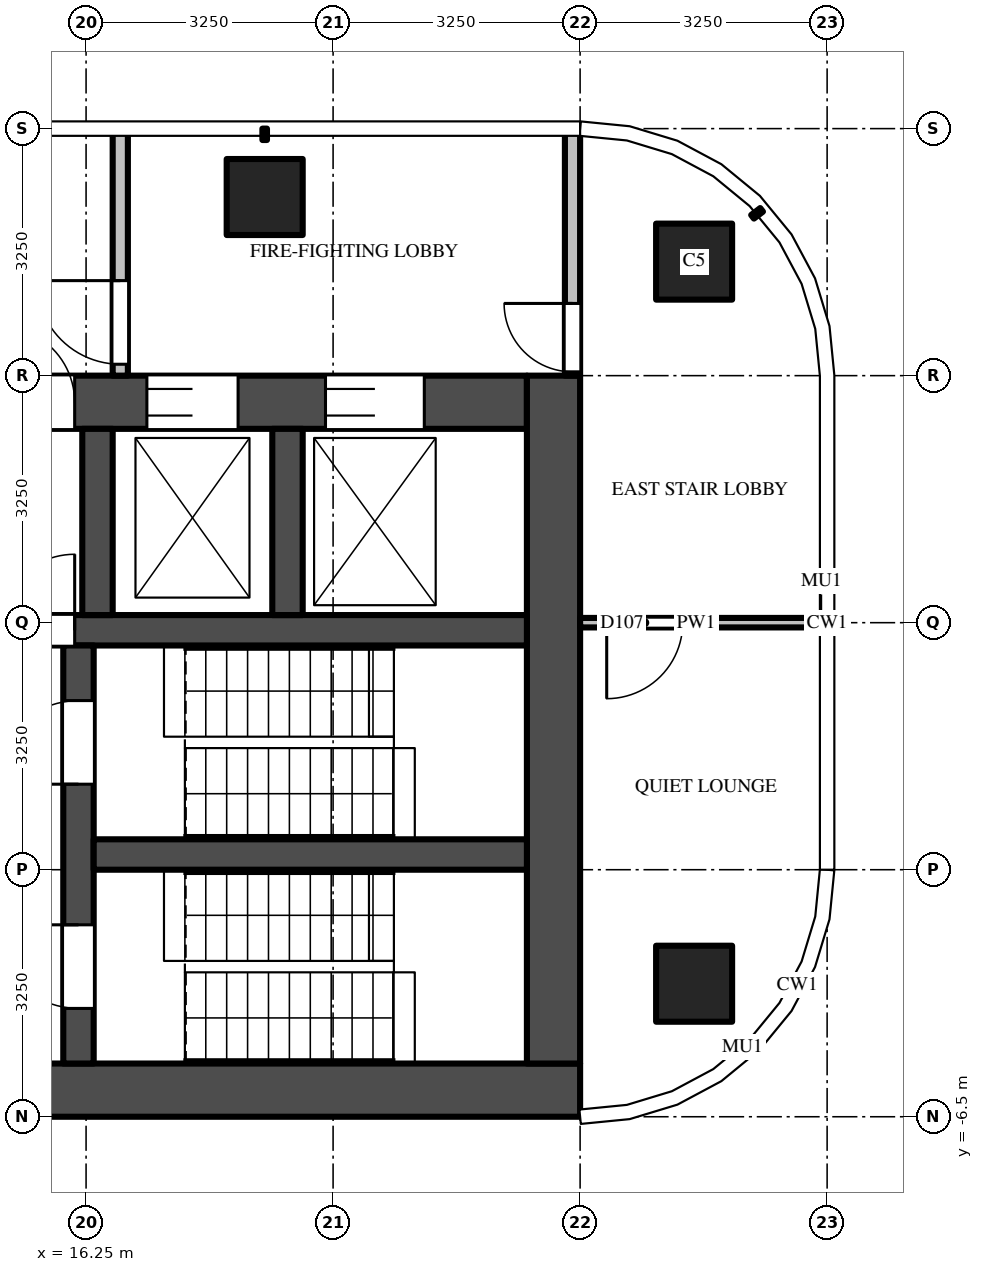
"""IFC4 building model, lengths in metres.
Left out: names, types, materials, properties, quantities, classifications, styles, units other than length and angle.
Written with IfcOpenShell. Run it as: python <this file> out.ifc"""

import sys

from ifc_helpers import new_model, si_unit, direction, frame, frame_2d, origin, origin_2d, place, context, subcontext, project, spatial, rectangle, extrude, source, transform, mapped, element, fill, save


model = new_model("IFC4")
c1 = context("Model", 3, precision=1e-05, world=origin(), true_north=direction((0.0, 1.0)))
c2 = subcontext(c1, "Body", "Model", "MODEL_VIEW")
j1 = project(units=[si_unit("LENGTHUNIT", "METRE"), si_unit("PLANEANGLEUNIT", "RADIAN")], contexts=[c1])
p1 = place(None, origin())
s1 = spatial("IfcSite", under=j1, at=p1, CompositionType="ELEMENT")
p2 = place(p1, origin())
s2 = spatial("IfcBuilding", under=s1, at=p2, CompositionType="ELEMENT")
p3 = place(p2, frame((0.0, 0.0, 283.3)))
s3 = spatial("IfcBuildingStorey", under=s2, at=p3, CompositionType="ELEMENT", Elevation=283.3)
m1 = source(origin(), c2, "Body", "SweptSolid", [
    extrude(rectangle(XDim=1.0, YDim=1.0, at=origin_2d()), origin(), (0.0, 0.0, 1.0), 3.9),
])
for number, where, z_axis, x_axis in (
    (1, (18.6, 5.6, 0.0), (0.0, 0.0, 1.0), (1.0, 0.0, 0.0)),
    (2, (24.25, 4.75, 0.0), (0.0, 0.0, 1.0), (1.0, 0.0, 0.0)),
    (3, (24.25, -4.75, 0.0), (0.0, 0.0, 1.0), (1.0, 0.0, 0.0)),
):
    element("IfcColumn", number, at=place(p3, frame(where, z_axis=z_axis, x_axis=x_axis)), inside=s3, PredefinedType="COLUMN", context=c2, shape_type="MappedRepresentation", body=[
        mapped(m1, transform((0.0, 0.0, 0.0))),
    ])
m2 = source(origin(), c2, "Body", "SweptSolid", [
    extrude(rectangle(XDim=16.65, YDim=0.7, at=frame_2d((8.325, 0.0))), origin(), (0.0, 0.0, 1.0), 3.7),
])
p4 = place(p3, frame((6.1, -6.15, 0.0), z_axis=(0.0, 0.0, 1.0), x_axis=(1.0, 0.0, 0.0)))
e4 = element("IfcWall", 4, at=p4, inside=s3, PredefinedType="SHEAR", context=c2, shape_type="MappedRepresentation", body=[
    mapped(m2, transform((0.0, 0.0, 0.0))),
])
m3 = source(origin(), c2, "Body", "SweptSolid", [
    extrude(rectangle(XDim=14.85, YDim=0.7, at=frame_2d((7.425, 0.0))), origin(), (0.0, 0.0, 1.0), 3.7),
])
p5 = place(p3, frame((7.2, 2.9, 0.0), z_axis=(0.0, 0.0, 1.0), x_axis=(1.0, 0.0, 0.0)))
e5 = element("IfcWall", 5, at=p5, inside=s3, PredefinedType="SHEAR", context=c2, shape_type="MappedRepresentation", body=[
    mapped(m3, transform((0.0, 0.0, 0.0))),
])
m4 = source(origin(), c2, "Body", "SweptSolid", [
    extrude(rectangle(XDim=1.2, YDim=2.1, at=frame_2d((0.6, 1.05))), frame((0.0, 0.36, 0.0), z_axis=(0.0, -1.0, 0.0), x_axis=(1.0, 0.0, 0.0)), (0.0, 0.0, 1.0), 0.72),
])
p6 = place(p5, frame((5.7, 0.0, 0.0)))
e6 = element("IfcOpeningElement", 6, at=p6, cuts=e5, PredefinedType="OPENING", context=c2, shape_type="MappedRepresentation", body=[
    mapped(m4, transform((0.0, 0.0, 0.0))),
])
m5 = source(origin(), c2, "Body", "SweptSolid", [
    extrude(rectangle(XDim=1.3, YDim=2.1, at=frame_2d((0.65, 1.05))), frame((0.0, 0.36, 0.0), z_axis=(0.0, -1.0, 0.0), x_axis=(1.0, 0.0, 0.0)), (0.0, 0.0, 1.0), 0.72),
])
p7 = place(p5, frame((12.2, 0.0, 0.0)))
e7 = element("IfcOpeningElement", 7, at=p7, cuts=e5, PredefinedType="OPENING", context=c2, shape_type="MappedRepresentation", body=[
    mapped(m5, transform((0.0, 0.0, 0.0))),
])
p8 = place(p5, frame((9.85, 0.0, 0.0)))
e8 = element("IfcOpeningElement", 8, at=p8, cuts=e5, PredefinedType="OPENING", context=c2, shape_type="MappedRepresentation", body=[
    mapped(m4, transform((0.0, 0.0, 0.0))),
])
m6 = source(origin(), c2, "Body", "SweptSolid", [
    extrude(rectangle(XDim=1.0, YDim=2.1, at=frame_2d((0.5, 1.05))), frame((0.0, 0.36, 0.0), z_axis=(0.0, -1.0, 0.0), x_axis=(1.0, 0.0, 0.0)), (0.0, 0.0, 1.0), 0.72),
])
p9 = place(p5, frame((7.9, 0.0, 0.0)))
e9 = element("IfcOpeningElement", 9, at=p9, cuts=e5, PredefinedType="OPENING", context=c2, shape_type="MappedRepresentation", body=[
    mapped(m6, transform((0.0, 0.0, 0.0))),
])
m7 = source(origin(), c2, "Body", "SweptSolid", [
    extrude(rectangle(XDim=0.8, YDim=2.1, at=frame_2d((0.4, 1.05))), frame((0.0, 0.36, 0.0), z_axis=(0.0, -1.0, 0.0), x_axis=(1.0, 0.0, 0.0)), (0.0, 0.0, 1.0), 0.72),
])
p10 = place(p5, frame((0.212, 0.0, 0.0)))
e10 = element("IfcOpeningElement", 10, at=p10, cuts=e5, PredefinedType="OPENING", context=c2, shape_type="MappedRepresentation", body=[
    mapped(m7, transform((0.0, 0.0, 0.0))),
])
p11 = place(p5, frame((2.587, 0.0, 0.0)))
e11 = element("IfcOpeningElement", 11, at=p11, cuts=e5, PredefinedType="OPENING", context=c2, shape_type="MappedRepresentation", body=[
    mapped(m6, transform((0.0, 0.0, 0.0))),
])
m8 = source(origin(), c2, "Body", "SweptSolid", [
    extrude(rectangle(XDim=9.05, YDim=0.7, at=frame_2d((4.525, 0.0))), origin(), (0.0, 0.0, 1.0), 3.7),
])
p12 = place(p3, frame((22.4, -5.8, 0.0), z_axis=(0.0, 0.0, 1.0), x_axis=(0.0, 1.0, 0.0)))
e12 = element("IfcWall", 12, at=p12, inside=s3, PredefinedType="SHEAR", context=c2, shape_type="MappedRepresentation", body=[
    mapped(m8, transform((0.0, 0.0, 0.0))),
])
m9 = source(origin(), c2, "Body", "SweptSolid", [
    extrude(rectangle(XDim=14.85, YDim=0.4, at=frame_2d((7.425, 0.0))), origin(), (0.0, 0.0, 1.0), 3.7),
])
p13 = place(p3, frame((7.2, -0.1, 0.0), z_axis=(0.0, 0.0, 1.0), x_axis=(1.0, 0.0, 0.0)))
e13 = element("IfcWall", 13, at=p13, inside=s3, PredefinedType="SHEAR", context=c2, shape_type="MappedRepresentation", body=[
    mapped(m9, transform((0.0, 0.0, 0.0))),
])
m10 = source(origin(), c2, "Body", "SweptSolid", [
    extrude(rectangle(XDim=1.0, YDim=2.1, at=frame_2d((0.5, 1.05))), frame((0.0, 0.21, 0.0), z_axis=(0.0, -1.0, 0.0), x_axis=(1.0, 0.0, 0.0)), (0.0, 0.0, 1.0), 0.42),
])
p14 = place(p13, frame((7.9, 0.0, 0.0)))
e14 = element("IfcOpeningElement", 14, at=p14, cuts=e13, PredefinedType="OPENING", context=c2, shape_type="MappedRepresentation", body=[
    mapped(m10, transform((0.0, 0.0, 0.0))),
])
m11 = source(origin(), c2, "Body", "SweptSolid", [
    extrude(rectangle(XDim=5.5, YDim=0.4, at=frame_2d((2.75, 0.0))), origin(), (0.0, 0.0, 1.0), 3.7),
])
p15 = place(p3, frame((16.15, -5.8, 0.0), z_axis=(0.0, 0.0, 1.0), x_axis=(0.0, 1.0, 0.0)))
e15 = element("IfcWall", 15, at=p15, inside=s3, PredefinedType="SHEAR", context=c2, shape_type="MappedRepresentation", body=[
    mapped(m11, transform((0.0, 0.0, 0.0))),
])
m12 = source(origin(), c2, "Body", "SweptSolid", [
    extrude(rectangle(XDim=1.1, YDim=2.1, at=frame_2d((0.55, 1.05))), frame((0.0, 0.21, 0.0), z_axis=(0.0, -1.0, 0.0), x_axis=(1.0, 0.0, 0.0)), (0.0, 0.0, 1.0), 0.42),
])
p16 = place(p15, frame((0.725, 0.0, 0.0)))
e16 = element("IfcOpeningElement", 16, at=p16, cuts=e15, PredefinedType="OPENING", context=c2, shape_type="MappedRepresentation", body=[
    mapped(m12, transform((0.0, 0.0, 0.0))),
])
p17 = place(p15, frame((3.675, 0.0, 0.0)))
e17 = element("IfcOpeningElement", 17, at=p17, cuts=e15, PredefinedType="OPENING", context=c2, shape_type="MappedRepresentation", body=[
    mapped(m12, transform((0.0, 0.0, 0.0))),
])
m13 = source(origin(), c2, "Body", "SweptSolid", [
    extrude(rectangle(XDim=5.7, YDim=0.4, at=frame_2d((2.85, 0.0))), origin(), (0.0, 0.0, 1.0), 3.7),
])
p18 = place(p3, frame((16.35, -3.05, 0.0), z_axis=(0.0, 0.0, 1.0), x_axis=(1.0, 0.0, 0.0)))
e18 = element("IfcWall", 18, at=p18, inside=s3, PredefinedType="SHEAR", context=c2, shape_type="MappedRepresentation", body=[
    mapped(m13, transform((0.0, 0.0, 0.0))),
])
m14 = source(origin(), c2, "Body", "SweptSolid", [
    extrude(rectangle(XDim=2.45, YDim=0.4, at=frame_2d((1.225, 0.0))), origin(), (0.0, 0.0, 1.0), 3.7),
])
for number, where, z_axis, x_axis in (
    (19, (16.4, 0.1, 0.0), (0.0, 0.0, 1.0), (0.0, 1.0, 0.0)),
    (20, (18.9, 0.1, 0.0), (0.0, 0.0, 1.0), (0.0, 1.0, 0.0)),
):
    element("IfcWall", number, at=place(p3, frame(where, z_axis=z_axis, x_axis=x_axis)), inside=s3, PredefinedType="SHEAR", context=c2, shape_type="MappedRepresentation", body=[
        mapped(m14, transform((0.0, 0.0, 0.0))),
    ])
m15 = source(origin(), c2, "Body", "SweptSolid", [
    extrude(rectangle(XDim=3.25, YDim=0.2, at=frame_2d((1.625, 0.0))), origin(), (0.0, 0.0, 1.0), 3.7),
])
p19 = place(p3, frame((16.7, 3.25, 0.0), z_axis=(0.0, 0.0, 1.0), x_axis=(0.0, 1.0, 0.0)))
e21 = element("IfcWall", 21, at=p19, inside=s3, PredefinedType="PARTITIONING", context=c2, shape_type="MappedRepresentation", body=[
    mapped(m15, transform((0.0, 0.0, 0.0))),
])
m16 = source(origin(), c2, "Body", "SweptSolid", [
    extrude(rectangle(XDim=1.1, YDim=2.1, at=frame_2d((0.55, 1.05))), frame((0.0, 0.11, 0.0), z_axis=(0.0, -1.0, 0.0), x_axis=(1.0, 0.0, 0.0)), (0.0, 0.0, 1.0), 0.22),
])
p20 = place(p19, frame((0.15, 0.0, 0.0)))
e22 = element("IfcOpeningElement", 22, at=p20, cuts=e21, PredefinedType="OPENING", context=c2, shape_type="MappedRepresentation", body=[
    mapped(m16, transform((0.0, 0.0, 0.0))),
])
p21 = place(p3, frame((22.65, 3.25, 0.0), z_axis=(0.0, 0.0, 1.0), x_axis=(0.0, 1.0, 0.0)))
e23 = element("IfcWall", 23, at=p21, inside=s3, PredefinedType="PARTITIONING", context=c2, shape_type="MappedRepresentation", body=[
    mapped(m15, transform((0.0, 0.0, 0.0))),
])
m17 = source(origin(), c2, "Body", "SweptSolid", [
    extrude(rectangle(XDim=0.9, YDim=2.1, at=frame_2d((0.45, 1.05))), frame((0.0, 0.11, 0.0), z_axis=(0.0, -1.0, 0.0), x_axis=(1.0, 0.0, 0.0)), (0.0, 0.0, 1.0), 0.22),
])
p22 = place(p21, frame((0.05, 0.0, 0.0)))
e24 = element("IfcOpeningElement", 24, at=p22, cuts=e23, PredefinedType="OPENING", context=c2, shape_type="MappedRepresentation", body=[
    mapped(m17, transform((0.0, 0.0, 0.0))),
])
m18 = source(origin(), c2, "Body", "SweptSolid", [
    extrude(rectangle(XDim=3.05, YDim=0.125, at=frame_2d((1.525, 0.0))), origin(), (0.0, 0.0, 1.0), 2.78),
])
p23 = place(p3, frame((25.8, 0.0, 0.0), z_axis=(0.0, 0.0, 1.0), x_axis=(-1.0, 0.0, 0.0)))
e25 = element("IfcWall", 25, at=p23, inside=s3, PredefinedType="PARTITIONING", context=c2, shape_type="MappedRepresentation", body=[
    mapped(m18, transform((0.0, 0.0, 0.0))),
])
m19 = source(origin(), c2, "Body", "SweptSolid", [
    extrude(rectangle(XDim=1.0, YDim=2.1, at=frame_2d((0.5, 1.05))), frame((0.0, 0.073, 0.0), z_axis=(0.0, -1.0, 0.0), x_axis=(1.0, 0.0, 0.0)), (0.0, 0.0, 1.0), 0.145),
])
p24 = place(p23, frame((1.7, 0.0, 0.0)))
e26 = element("IfcOpeningElement", 26, at=p24, cuts=e25, PredefinedType="OPENING", context=c2, shape_type="MappedRepresentation", body=[
    mapped(m19, transform((0.0, 0.0, 0.0))),
])
m20 = source(origin(), c2, "Body", "SweptSolid", [
    extrude(rectangle(XDim=1.3, YDim=2.1, at=frame_2d((0.65, 1.05))), frame((0.0, -0.275, 0.0), z_axis=(0.0, -1.0, 0.0), x_axis=(1.0, 0.0, 0.0)), (0.0, 0.0, 1.0), 0.05),
])
p25 = place(p7, origin())
e27 = element("IfcDoor", 27, at=p25, inside=s3, OperationType="DOUBLE_DOOR_SLIDING", PredefinedType="DOOR", context=c2, shape_type="MappedRepresentation", body=[
    mapped(m20, transform((0.0, 0.0, 0.0))),
])
fill(e7, e27)
m21 = source(origin(), c2, "Body", "SweptSolid", [
    extrude(rectangle(XDim=1.2, YDim=2.1, at=frame_2d((0.6, 1.05))), frame((0.0, -0.275, 0.0), z_axis=(0.0, -1.0, 0.0), x_axis=(1.0, 0.0, 0.0)), (0.0, 0.0, 1.0), 0.05),
])
p26 = place(p8, origin())
e28 = element("IfcDoor", 28, at=p26, inside=s3, OperationType="DOUBLE_DOOR_SLIDING", PredefinedType="DOOR", context=c2, shape_type="MappedRepresentation", body=[
    mapped(m21, transform((0.0, 0.0, 0.0))),
])
fill(e8, e28)
m22 = source(origin(), c2, "Body", "SweptSolid", [
    extrude(rectangle(XDim=1.1, YDim=2.1, at=frame_2d((0.55, 1.05))), frame((0.0, 0.025, 0.0), z_axis=(0.0, -1.0, 0.0), x_axis=(1.0, 0.0, 0.0)), (0.0, 0.0, 1.0), 0.05),
])
p27 = place(p16, origin())
e29 = element("IfcDoor", 29, at=p27, inside=s3, OperationType="SINGLE_SWING_RIGHT", PredefinedType="DOOR", context=c2, shape_type="MappedRepresentation", body=[
    mapped(m22, transform((0.0, 0.0, 0.0))),
])
fill(e16, e29)
p28 = place(p17, origin())
e30 = element("IfcDoor", 30, at=p28, inside=s3, OperationType="SINGLE_SWING_LEFT", PredefinedType="DOOR", context=c2, shape_type="MappedRepresentation", body=[
    mapped(m22, transform((0.0, 0.0, 0.0))),
])
fill(e17, e30)
m23 = source(origin(), c2, "Body", "SweptSolid", [
    extrude(rectangle(XDim=1.0, YDim=2.1, at=frame_2d((0.5, 1.05))), frame((0.0, 0.025, 0.0), z_axis=(0.0, -1.0, 0.0), x_axis=(1.0, 0.0, 0.0)), (0.0, 0.0, 1.0), 0.05),
])
p29 = place(p14, origin())
e31 = element("IfcDoor", 31, at=p29, inside=s3, OperationType="SINGLE_SWING_RIGHT", PredefinedType="DOOR", context=c2, shape_type="MappedRepresentation", body=[
    mapped(m23, transform((0.0, 0.0, 0.0))),
])
fill(e14, e31)
m24 = source(origin(), c2, "Body", "SweptSolid", [
    extrude(rectangle(XDim=1.0, YDim=2.1, at=frame_2d((0.5, 1.05))), frame((0.0, -0.275, 0.0), z_axis=(0.0, -1.0, 0.0), x_axis=(1.0, 0.0, 0.0)), (0.0, 0.0, 1.0), 0.05),
])
p30 = place(p9, origin())
e32 = element("IfcDoor", 32, at=p30, inside=s3, OperationType="SINGLE_SWING_LEFT", PredefinedType="DOOR", context=c2, shape_type="MappedRepresentation", body=[
    mapped(m24, transform((0.0, 0.0, 0.0))),
])
fill(e9, e32)
p31 = place(p20, origin())
e33 = element("IfcDoor", 33, at=p31, inside=s3, OperationType="SINGLE_SWING_RIGHT", PredefinedType="DOOR", context=c2, shape_type="MappedRepresentation", body=[
    mapped(m22, transform((0.0, 0.0, 0.0))),
])
fill(e22, e33)
m25 = source(origin(), c2, "Body", "SweptSolid", [
    extrude(rectangle(XDim=0.9, YDim=2.1, at=frame_2d((0.45, 1.05))), frame((0.0, 0.025, 0.0), z_axis=(0.0, -1.0, 0.0), x_axis=(1.0, 0.0, 0.0)), (0.0, 0.0, 1.0), 0.05),
])
p32 = place(p22, origin())
e34 = element("IfcDoor", 34, at=p32, inside=s3, OperationType="SINGLE_SWING_RIGHT", PredefinedType="DOOR", context=c2, shape_type="MappedRepresentation", body=[
    mapped(m25, transform((0.0, 0.0, 0.0))),
])
fill(e24, e34)
p33 = place(p24, origin())
e35 = element("IfcDoor", 35, at=p33, inside=s3, OperationType="SINGLE_SWING_RIGHT", PredefinedType="DOOR", context=c2, shape_type="MappedRepresentation", body=[
    mapped(m23, transform((0.0, 0.0, 0.0))),
])
fill(e26, e35)
save(model, sys.argv[1])
